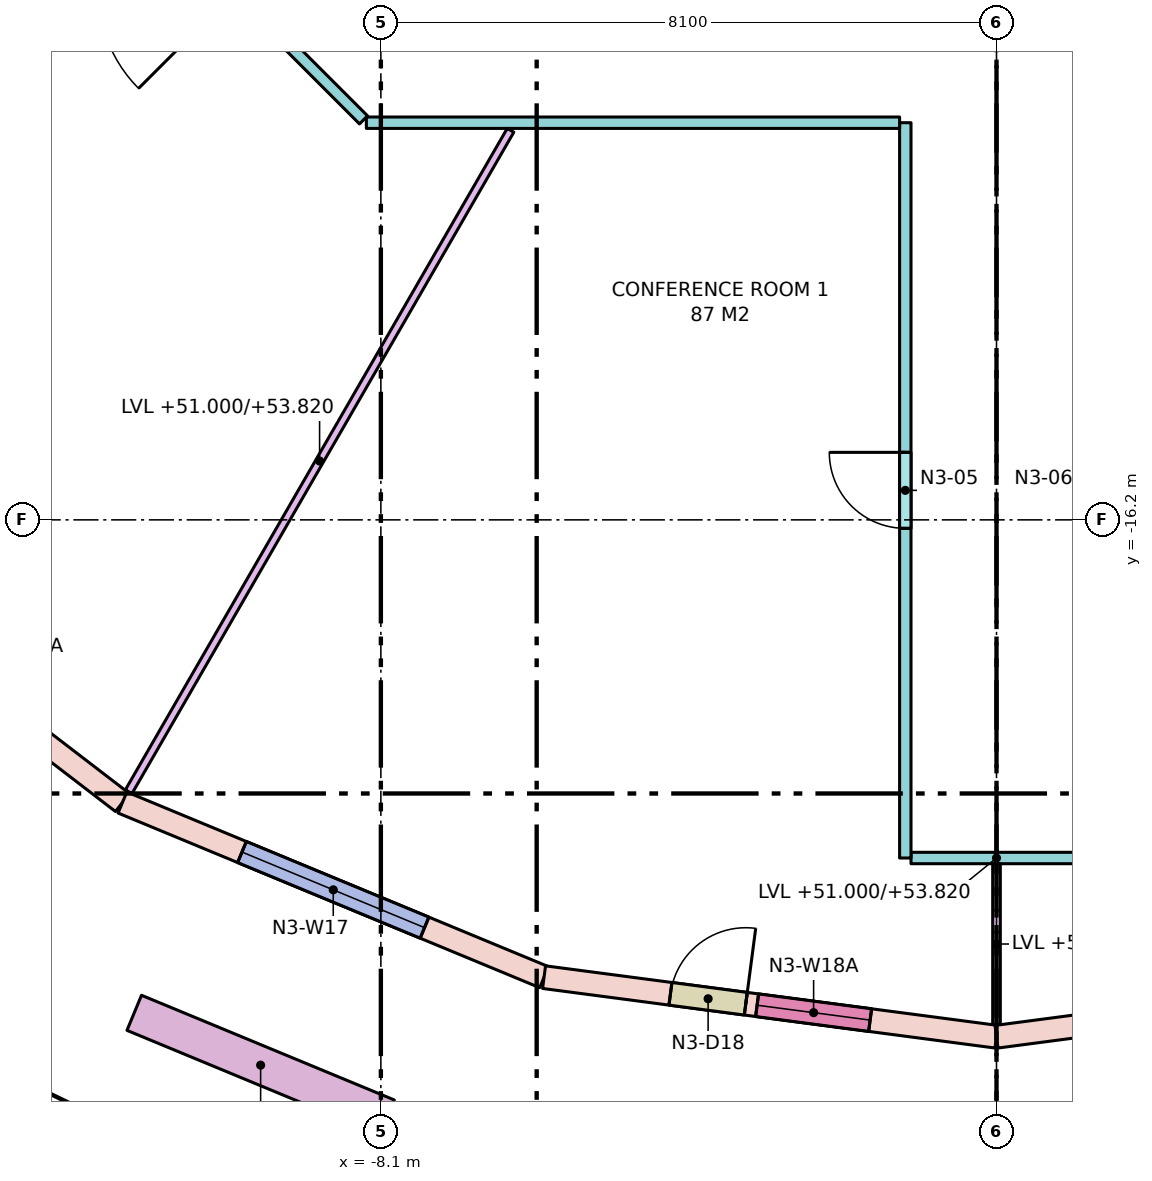
"""IFC4 building model, lengths in metres.
Left out: names, types, materials, properties, quantities, classifications, styles, units other than length and angle.
Written with IfcOpenShell. Run it as: python <this file> out.ifc"""

import sys

from ifc_helpers import new_model, si_unit, direction, frame, frame_2d, origin, place, context, subcontext, project, spatial, rectangle, extrude, element, fill, save


model = new_model("IFC4")
c1 = context("Model", 3, precision=1e-05, world=origin(), true_north=direction((0.0, 1.0)))
c2 = subcontext(c1, "Body", "Model", "MODEL_VIEW")
j1 = project(units=[si_unit("LENGTHUNIT", "METRE"), si_unit("PLANEANGLEUNIT", "RADIAN")], contexts=[c1])
p1 = place(None, origin())
s1 = spatial("IfcSite", under=j1, at=p1, CompositionType="ELEMENT")
p2 = place(p1, origin())
s2 = spatial("IfcBuilding", under=s1, at=p2, CompositionType="ELEMENT")
p3 = place(p2, frame((0.0, 0.0, 51.0)))
s3 = spatial("IfcBuildingStorey", under=s2, at=p3, CompositionType="ELEMENT", Elevation=51.0)
p4 = place(p3, frame((-16.263, -16.263, 0.0), z_axis=(0.0, 0.0, 1.0), x_axis=(0.793339924758, -0.608778912074, 0.0)))
e1 = element("IfcWall", 1, at=p4, inside=s3, PredefinedType="STANDARD", context=c2, shape_type="SweptSolid", body=[
    extrude(rectangle(XDim=6.004, YDim=0.3, at=frame_2d((3.002, 0.0))), origin(), (0.0, 0.0, 1.0), 3.72),
])
p5 = place(p4, frame((1.677, 0.0, 0.0)))
e2 = element("IfcOpeningElement", 2, at=p5, cuts=e1, PredefinedType="OPENING", context=c2, shape_type="SweptSolid", body=[
    extrude(rectangle(XDim=1.0, YDim=2.4, at=frame_2d((0.5, 1.2))), frame((0.0, 0.16, 0.0), z_axis=(0.0, -1.0, 0.0), x_axis=(1.0, 0.0, 0.0)), (0.0, 0.0, 1.0), 0.32),
])
p6 = place(p4, frame((2.827, 0.0, 0.8)))
e3 = element("IfcOpeningElement", 3, at=p6, cuts=e1, PredefinedType="OPENING", context=c2, shape_type="SweptSolid", body=[
    extrude(rectangle(XDim=1.5, YDim=2.7, at=frame_2d((0.75, 1.35))), frame((0.0, 0.16, 0.0), z_axis=(0.0, -1.0, 0.0), x_axis=(1.0, 0.0, 0.0)), (0.0, 0.0, 1.0), 0.32),
])
p7 = place(p3, frame((-11.5, -19.919, 0.0), z_axis=(0.0, 0.0, 1.0), x_axis=(0.923884511653, -0.382671411433, 0.0)))
e4 = element("IfcWall", 4, at=p7, inside=s3, PredefinedType="STANDARD", context=c2, shape_type="SweptSolid", body=[
    extrude(rectangle(XDim=6.004, YDim=0.3, at=frame_2d((3.002, 0.0))), origin(), (0.0, 0.0, 1.0), 3.72),
])
p8 = place(p7, frame((1.702, 0.0, 0.8)))
e5 = element("IfcOpeningElement", 5, at=p8, cuts=e4, PredefinedType="OPENING", context=c2, shape_type="SweptSolid", body=[
    extrude(rectangle(XDim=2.6, YDim=2.7, at=frame_2d((1.3, 1.35))), frame((0.0, 0.16, 0.0), z_axis=(0.0, -1.0, 0.0), x_axis=(1.0, 0.0, 0.0)), (0.0, 0.0, 1.0), 0.32),
])
p9 = place(p3, frame((-5.953, -22.216, 0.0), z_axis=(0.0, 0.0, 1.0), x_axis=(0.991445297315, -0.130522880875, 0.0)))
e6 = element("IfcWall", 6, at=p9, inside=s3, PredefinedType="STANDARD", context=c2, shape_type="SweptSolid", body=[
    extrude(rectangle(XDim=6.004, YDim=0.3, at=frame_2d((3.002, 0.0))), origin(), (0.0, 0.0, 1.0), 3.72),
])
p10 = place(p9, frame((1.677, 0.0, 0.0)))
e7 = element("IfcOpeningElement", 7, at=p10, cuts=e6, PredefinedType="OPENING", context=c2, shape_type="SweptSolid", body=[
    extrude(rectangle(XDim=1.0, YDim=2.4, at=frame_2d((0.5, 1.2))), frame((0.0, 0.16, 0.0), z_axis=(0.0, -1.0, 0.0), x_axis=(1.0, 0.0, 0.0)), (0.0, 0.0, 1.0), 0.32),
])
p11 = place(p9, frame((2.827, 0.0, 0.8)))
e8 = element("IfcOpeningElement", 8, at=p11, cuts=e6, PredefinedType="OPENING", context=c2, shape_type="SweptSolid", body=[
    extrude(rectangle(XDim=1.5, YDim=2.7, at=frame_2d((0.75, 1.35))), frame((0.0, 0.16, 0.0), z_axis=(0.0, -1.0, 0.0), x_axis=(1.0, 0.0, 0.0)), (0.0, 0.0, 1.0), 0.32),
])
p12 = place(p3, frame((0.0, -23.0, 0.0), z_axis=(0.0, 0.0, 1.0), x_axis=(0.991445297315, 0.130522880875, 0.0)))
e9 = element("IfcWall", 9, at=p12, inside=s3, PredefinedType="STANDARD", context=c2, shape_type="SweptSolid", body=[
    extrude(rectangle(XDim=6.004, YDim=0.3, at=frame_2d((3.002, 0.0))), origin(), (0.0, 0.0, 1.0), 3.72),
])
p13 = place(p12, frame((1.702, 0.0, 0.8)))
e10 = element("IfcOpeningElement", 10, at=p13, cuts=e9, PredefinedType="OPENING", context=c2, shape_type="SweptSolid", body=[
    extrude(rectangle(XDim=2.6, YDim=2.7, at=frame_2d((1.3, 1.35))), frame((0.0, 0.16, 0.0), z_axis=(0.0, -1.0, 0.0), x_axis=(1.0, 0.0, 0.0)), (0.0, 0.0, 1.0), 0.32),
])
p14 = place(p3, frame((-11.345, -22.685, 0.0), z_axis=(0.0, 0.0, 1.0), x_axis=(0.923885420167, -0.382669217998, 0.0)))
e11 = element("IfcWall", 11, at=p14, inside=s3, PredefinedType="PARAPET", context=c2, shape_type="SweptSolid", body=[
    extrude(rectangle(XDim=3.6, YDim=0.5, at=frame_2d((1.8, 0.0))), origin(), (0.0, 0.0, 1.0), 0.9),
])
p15 = place(p3, frame((1.125, -20.649, 0.0), z_axis=(0.0, 0.0, 1.0), x_axis=(-1.0, 0.0, 0.0)))
e12 = element("IfcWall", 12, at=p15, inside=s3, PredefinedType="PARTITIONING", context=c2, shape_type="SweptSolid", body=[
    extrude(rectangle(XDim=2.25, YDim=0.15, at=frame_2d((1.125, 0.0))), origin(), (0.0, 0.0, 1.0), 2.82),
])
p16 = place(p3, frame((-1.2, -20.649, 0.0), z_axis=(0.0, 0.0, 1.0), x_axis=(0.0, 1.0, 0.0)))
e13 = element("IfcWall", 13, at=p16, inside=s3, PredefinedType="PARTITIONING", context=c2, shape_type="SweptSolid", body=[
    extrude(rectangle(XDim=9.674, YDim=0.15, at=frame_2d((4.837, 0.0))), origin(), (0.0, 0.0, 1.0), 3.72),
])
p17 = place(p16, frame((4.337, 0.0, 0.0)))
e14 = element("IfcOpeningElement", 14, at=p17, cuts=e13, PredefinedType="OPENING", context=c2, shape_type="SweptSolid", body=[
    extrude(rectangle(XDim=1.0, YDim=2.1, at=frame_2d((0.5, 1.05))), frame((0.0, 0.085, 0.0), z_axis=(0.0, -1.0, 0.0), x_axis=(1.0, 0.0, 0.0)), (0.0, 0.0, 1.0), 0.17),
])
p18 = place(p3, frame((-1.275, -10.975, 0.0), z_axis=(0.0, 0.0, 1.0), x_axis=(-1.0, 0.0, 0.0)))
e15 = element("IfcWall", 15, at=p18, inside=s3, PredefinedType="PARTITIONING", context=c2, shape_type="SweptSolid", body=[
    extrude(rectangle(XDim=7.016, YDim=0.15, at=frame_2d((3.508, 0.0))), origin(), (0.0, 0.0, 1.0), 2.82),
])
p19 = place(p3, frame((-8.328, -10.938, 0.0), z_axis=(0.0, 0.0, 1.0), x_axis=(-0.707125355289, 0.707088206597, 0.0)))
e16 = element("IfcWall", 16, at=p19, inside=s3, PredefinedType="PARTITIONING", context=c2, shape_type="SweptSolid", body=[
    extrude(rectangle(XDim=6.572, YDim=0.15, at=frame_2d((3.286, 0.0))), origin(), (0.0, 0.0, 1.0), 2.82),
])
p20 = place(p19, frame((2.386, 0.0, 0.0)))
e17 = element("IfcOpeningElement", 17, at=p20, cuts=e16, PredefinedType="OPENING", context=c2, shape_type="SweptSolid", body=[
    extrude(rectangle(XDim=1.8, YDim=2.1, at=frame_2d((0.9, 1.05))), frame((0.0, 0.085, 0.0), z_axis=(0.0, -1.0, 0.0), x_axis=(1.0, 0.0, 0.0)), (0.0, 0.0, 1.0), 0.17),
])
p21 = place(p3, frame((-6.394, -11.075, 0.0), z_axis=(0.0, 0.0, 1.0), x_axis=(-0.500024592647, -0.866011204747, 0.0)))
e18 = element("IfcWall", 18, at=p21, inside=s3, PredefinedType="PARTITIONING", context=c2, shape_type="SweptSolid", body=[
    extrude(rectangle(XDim=10.049, YDim=0.1, at=frame_2d((5.024, 0.0))), origin(), (0.0, 0.0, 1.0), 2.82),
])
p22 = place(p3, frame((0.0, -20.724, 0.0), z_axis=(0.0, 0.0, 1.0), x_axis=(0.0, -1.0, 0.0)))
e19 = element("IfcWall", 19, at=p22, inside=s3, PredefinedType="PARTITIONING", context=c2, shape_type="SweptSolid", body=[
    extrude(rectangle(XDim=2.113, YDim=0.1, at=frame_2d((1.057, 0.0))), origin(), (0.0, 0.0, 1.0), 2.82),
])
p23 = place(p8, origin())
e20 = element("IfcWindow", 20, at=p23, inside=s3, PartitioningType="SINGLE_PANEL", PredefinedType="WINDOW", context=c2, shape_type="SweptSolid", body=[
    extrude(rectangle(XDim=2.6, YDim=2.7, at=frame_2d((1.3, 1.35))), frame((0.0, 0.03, 0.0), z_axis=(0.0, -1.0, 0.0), x_axis=(1.0, 0.0, 0.0)), (0.0, 0.0, 1.0), 0.06),
])
fill(e5, e20)
p24 = place(p10, origin())
e21 = element("IfcDoor", 21, at=p24, inside=s3, OperationType="SINGLE_SWING_RIGHT", PredefinedType="DOOR", context=c2, shape_type="SweptSolid", body=[
    extrude(rectangle(XDim=1.0, YDim=2.4, at=frame_2d((0.5, 1.2))), frame((0.0, 0.025, 0.0), z_axis=(0.0, -1.0, 0.0), x_axis=(1.0, 0.0, 0.0)), (0.0, 0.0, 1.0), 0.05),
])
fill(e7, e21)
p25 = place(p11, origin())
e22 = element("IfcWindow", 22, at=p25, inside=s3, PartitioningType="SINGLE_PANEL", PredefinedType="WINDOW", context=c2, shape_type="SweptSolid", body=[
    extrude(rectangle(XDim=1.5, YDim=2.7, at=frame_2d((0.75, 1.35))), frame((0.0, 0.03, 0.0), z_axis=(0.0, -1.0, 0.0), x_axis=(1.0, 0.0, 0.0)), (0.0, 0.0, 1.0), 0.06),
])
fill(e8, e22)
p26 = place(p17, origin())
e23 = element("IfcDoor", 23, at=p26, inside=s3, OperationType="SINGLE_SWING_RIGHT", PredefinedType="DOOR", context=c2, shape_type="SweptSolid", body=[
    extrude(rectangle(XDim=1.0, YDim=2.1, at=frame_2d((0.5, 1.05))), frame((0.0, 0.025, 0.0), z_axis=(0.0, -1.0, 0.0), x_axis=(1.0, 0.0, 0.0)), (0.0, 0.0, 1.0), 0.05),
])
fill(e14, e23)
save(model, sys.argv[1])
